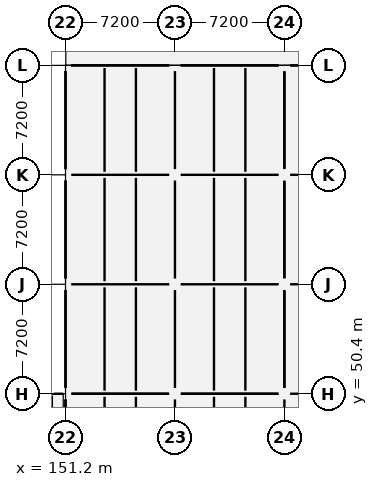
"""IFC4 building model, lengths in metres.
Left out: names, types, materials, properties, quantities, classifications, styles, units other than length and angle.
Written with IfcOpenShell. Run it as: python <this file> out.ifc"""

import sys

from ifc_helpers import new_model, si_unit, direction, frame, frame_2d, origin, origin_2d, place, context, subcontext, project, spatial, rectangle, hollow_rectangle, extrude, element, fill, save


model = new_model("IFC4")
c1 = context("Model", 3, precision=1e-05, world=origin(), true_north=direction((0.0, 1.0)))
c2 = subcontext(c1, "Body", "Model", "MODEL_VIEW")
j1 = project(units=[si_unit("LENGTHUNIT", "METRE"), si_unit("PLANEANGLEUNIT", "RADIAN")], contexts=[c1])
p1 = place(None, origin())
s1 = spatial("IfcSite", under=j1, at=p1, CompositionType="ELEMENT")
p2 = place(p1, origin())
s2 = spatial("IfcBuilding", under=s1, at=p2, CompositionType="ELEMENT")
p3 = place(p2, frame((0.0, 0.0, 5.4)))
s3 = spatial("IfcBuildingStorey", under=s2, at=p3, CompositionType="ELEMENT", Elevation=5.4)
for number, where, z_axis, x_axis in (
    (1, (151.2, 50.4, 0.0), (0.0, 0.0, 1.0), (1.0, 0.0, 0.0)),
    (2, (151.2, 57.6, 0.0), (0.0, 0.0, 1.0), (1.0, 0.0, 0.0)),
    (3, (151.2, 64.8, 0.0), (0.0, 0.0, 1.0), (1.0, 0.0, 0.0)),
    (4, (151.2, 72.0, 0.0), (0.0, 0.0, 1.0), (1.0, 0.0, 0.0)),
    (5, (158.4, 50.4, 0.0), (0.0, 0.0, 1.0), (1.0, 0.0, 0.0)),
    (6, (158.4, 57.6, 0.0), (0.0, 0.0, 1.0), (1.0, 0.0, 0.0)),
    (7, (158.4, 64.8, 0.0), (0.0, 0.0, 1.0), (1.0, 0.0, 0.0)),
    (8, (158.4, 72.0, 0.0), (0.0, 0.0, 1.0), (1.0, 0.0, 0.0)),
    (9, (165.6, 50.4, 0.0), (0.0, 0.0, 1.0), (1.0, 0.0, 0.0)),
    (10, (165.6, 57.6, 0.0), (0.0, 0.0, 1.0), (1.0, 0.0, 0.0)),
    (11, (165.6, 64.8, 0.0), (0.0, 0.0, 1.0), (1.0, 0.0, 0.0)),
    (12, (165.6, 72.0, 0.0), (0.0, 0.0, 1.0), (1.0, 0.0, 0.0)),
):
    element("IfcColumn", number, at=place(p3, frame(where, z_axis=z_axis, x_axis=x_axis)), inside=s3, PredefinedType="COLUMN", context=c2, shape_type="SweptSolid", body=[
        extrude(rectangle(XDim=0.75, YDim=0.75, at=origin_2d()), origin(), (0.0, 0.0, 1.0), 4.2),
    ])
p4 = place(p3, frame((150.3, 50.4, 0.0), z_axis=(0.0, 0.0, 1.0), x_axis=(1.0, 0.0, 0.0)))
e13 = element("IfcColumn", 13, at=p4, inside=s3, PredefinedType="COLUMN", context=c2, shape_type="SweptSolid", body=[
    extrude(hollow_rectangle(XDim=0.25, YDim=0.25, WallThickness=0.012, InnerFilletRadius=0.012, OuterFilletRadius=0.024, at=origin_2d()), origin(), (0.0, 0.0, 1.0), 4.2),
])
p5 = place(p3, frame((151.2, 43.575, 0.0), z_axis=(0.0, 0.0, 1.0), x_axis=(0.0, 1.0, 0.0)))
e14 = element("IfcWall", 14, at=p5, inside=s3, PredefinedType="ELEMENTEDWALL", context=c2, shape_type="SweptSolid", body=[
    extrude(rectangle(XDim=6.45, YDim=0.32, at=frame_2d((3.225, 0.0))), origin(), (0.0, 0.0, 1.0), 3.34),
])
p6 = place(p5, frame((2.475, 0.0, 0.0)))
e15 = element("IfcOpeningElement", 15, at=p6, cuts=e14, PredefinedType="OPENING", context=c2, shape_type="SweptSolid", body=[
    extrude(rectangle(XDim=1.5, YDim=2.2, at=frame_2d((0.75, 1.1))), frame((0.0, 0.172, 0.0), z_axis=(0.0, -1.0, 0.0), x_axis=(1.0, 0.0, 0.0)), (0.0, 0.0, 1.0), 0.344),
])
p7 = place(p3, frame((151.2, 53.8, 0.0), z_axis=(0.0, 0.0, 1.0), x_axis=(0.0, 1.0, 0.0)))
e16 = element("IfcWall", 16, at=p7, inside=s3, PredefinedType="SOLIDWALL", context=c2, shape_type="SweptSolid", body=[
    extrude(rectangle(XDim=0.4, YDim=0.36, at=frame_2d((0.2, 0.0))), origin(), (0.0, 0.0, 1.0), 3.29),
])
p8 = place(p3, frame((151.2, 61.0, 0.0), z_axis=(0.0, 0.0, 1.0), x_axis=(0.0, 1.0, 0.0)))
e17 = element("IfcWall", 17, at=p8, inside=s3, PredefinedType="SOLIDWALL", context=c2, shape_type="SweptSolid", body=[
    extrude(rectangle(XDim=0.4, YDim=0.36, at=frame_2d((0.2, 0.0))), origin(), (0.0, 0.0, 1.0), 3.35),
])
p9 = place(p3, frame((151.2, 68.2, 0.0), z_axis=(0.0, 0.0, 1.0), x_axis=(0.0, 1.0, 0.0)))
e18 = element("IfcWall", 18, at=p9, inside=s3, PredefinedType="SOLIDWALL", context=c2, shape_type="SweptSolid", body=[
    extrude(rectangle(XDim=0.4, YDim=0.36, at=frame_2d((0.2, 0.0))), origin(), (0.0, 0.0, 1.0), 3.3),
])
p10 = place(p3, frame((151.575, 72.0, 0.0), z_axis=(0.0, 0.0, 1.0), x_axis=(1.0, 0.0, 0.0)))
e19 = element("IfcWall", 19, at=p10, inside=s3, PredefinedType="ELEMENTEDWALL", context=c2, shape_type="SweptSolid", body=[
    extrude(rectangle(XDim=6.45, YDim=0.32, at=frame_2d((3.225, 0.0))), origin(), (0.0, 0.0, 1.0), 3.3),
])
p11 = place(p10, frame((2.475, 0.0, 0.0)))
e20 = element("IfcOpeningElement", 20, at=p11, cuts=e19, PredefinedType="OPENING", context=c2, shape_type="SweptSolid", body=[
    extrude(rectangle(XDim=1.5, YDim=2.2, at=frame_2d((0.75, 1.1))), frame((0.0, 0.172, 0.0), z_axis=(0.0, -1.0, 0.0), x_axis=(1.0, 0.0, 0.0)), (0.0, 0.0, 1.0), 0.344),
])
p12 = place(p3, frame((158.775, 72.0, 0.0), z_axis=(0.0, 0.0, 1.0), x_axis=(1.0, 0.0, 0.0)))
e21 = element("IfcWall", 21, at=p12, inside=s3, PredefinedType="ELEMENTEDWALL", context=c2, shape_type="SweptSolid", body=[
    extrude(rectangle(XDim=6.45, YDim=0.32, at=frame_2d((3.225, 0.0))), origin(), (0.0, 0.0, 1.0), 3.3),
])
p13 = place(p12, frame((2.225, 0.0, 0.85)))
e22 = element("IfcOpeningElement", 22, at=p13, cuts=e21, PredefinedType="OPENING", context=c2, shape_type="SweptSolid", body=[
    extrude(rectangle(XDim=2.0, YDim=1.85, at=frame_2d((1.0, 0.925))), frame((0.0, 0.172, 0.0), z_axis=(0.0, -1.0, 0.0), x_axis=(1.0, 0.0, 0.0)), (0.0, 0.0, 1.0), 0.344),
])
p14 = place(p3, frame((165.975, 72.0, 0.0), z_axis=(0.0, 0.0, 1.0), x_axis=(1.0, 0.0, 0.0)))
e23 = element("IfcWall", 23, at=p14, inside=s3, PredefinedType="ELEMENTEDWALL", context=c2, shape_type="SweptSolid", body=[
    extrude(rectangle(XDim=6.45, YDim=0.32, at=frame_2d((3.225, 0.0))), origin(), (0.0, 0.0, 1.0), 3.3),
])
p15 = place(p14, frame((2.625, 0.0, 0.85)))
e24 = element("IfcOpeningElement", 24, at=p15, cuts=e23, PredefinedType="OPENING", context=c2, shape_type="SweptSolid", body=[
    extrude(rectangle(XDim=1.2, YDim=2.2, at=frame_2d((0.6, 1.1))), frame((0.0, 0.172, 0.0), z_axis=(0.0, -1.0, 0.0), x_axis=(1.0, 0.0, 0.0)), (0.0, 0.0, 1.0), 0.344),
])
p16 = place(p3, frame((150.425, 50.4, 0.0), z_axis=(0.0, 0.0, 1.0), x_axis=(1.0, 0.0, 0.0)))
e25 = element("IfcWall", 25, at=p16, inside=s3, PredefinedType="ELEMENTEDWALL", context=c2, shape_type="SweptSolid", body=[
    extrude(rectangle(XDim=0.625, YDim=0.28, at=frame_2d((0.312, 0.0))), origin(), (0.0, 0.0, 1.0), 3.72),
])
p17 = place(p3, frame((165.6, 50.815, 0.0), z_axis=(0.0, 0.0, 1.0), x_axis=(0.0, 1.0, 0.0)))
e26 = element("IfcWall", 26, at=p17, inside=s3, PredefinedType="PARTITIONING", context=c2, shape_type="SweptSolid", body=[
    extrude(rectangle(XDim=6.37, YDim=0.1, at=frame_2d((3.185, 0.0))), origin(), (0.0, 0.0, 1.0), 3.288),
])
p18 = place(p17, frame((2.56, 0.0, 0.0)))
e27 = element("IfcOpeningElement", 27, at=p18, cuts=e26, PredefinedType="OPENING", context=c2, shape_type="SweptSolid", body=[
    extrude(rectangle(XDim=1.25, YDim=2.15, at=frame_2d((0.625, 1.075))), frame((0.0, 0.062, 0.0), z_axis=(0.0, -1.0, 0.0), x_axis=(1.0, 0.0, 0.0)), (0.0, 0.0, 1.0), 0.124),
])
p19 = place(p3, frame((165.6, 58.015, 0.0), z_axis=(0.0, 0.0, 1.0), x_axis=(0.0, 1.0, 0.0)))
e28 = element("IfcWall", 28, at=p19, inside=s3, PredefinedType="PARTITIONING", context=c2, shape_type="SweptSolid", body=[
    extrude(rectangle(XDim=6.37, YDim=0.1, at=frame_2d((3.185, 0.0))), origin(), (0.0, 0.0, 1.0), 3.348),
])
p20 = place(p3, frame((165.6, 65.215, 0.0), z_axis=(0.0, 0.0, 1.0), x_axis=(0.0, 1.0, 0.0)))
e29 = element("IfcWall", 29, at=p20, inside=s3, PredefinedType="PARTITIONING", context=c2, shape_type="SweptSolid", body=[
    extrude(rectangle(XDim=6.37, YDim=0.1, at=frame_2d((3.185, 0.0))), origin(), (0.0, 0.0, 1.0), 3.298),
])
p21 = place(p3, frame((151.615, 50.4, 0.0), z_axis=(0.0, 0.0, 1.0), x_axis=(1.0, 0.0, 0.0)))
e30 = element("IfcWall", 30, at=p21, inside=s3, PredefinedType="PARTITIONING", context=c2, shape_type="SweptSolid", body=[
    extrude(rectangle(XDim=6.37, YDim=0.1, at=frame_2d((3.185, 0.0))), origin(), (0.0, 0.0, 1.0), 3.238),
])
p22 = place(p3, frame((158.815, 50.4, 0.0), z_axis=(0.0, 0.0, 1.0), x_axis=(1.0, 0.0, 0.0)))
e31 = element("IfcWall", 31, at=p22, inside=s3, PredefinedType="PARTITIONING", context=c2, shape_type="SweptSolid", body=[
    extrude(rectangle(XDim=6.37, YDim=0.1, at=frame_2d((3.185, 0.0))), origin(), (0.0, 0.0, 1.0), 3.188),
])
p23 = place(p11, origin())
e32 = element("IfcDoor", 32, at=p23, inside=s3, OperationType="DOUBLE_SWING_LEFT", PredefinedType="DOOR", context=c2, shape_type="SweptSolid", body=[
    extrude(rectangle(XDim=1.5, YDim=2.2, at=frame_2d((0.75, 1.1))), frame((0.0, 0.025, 0.0), z_axis=(0.0, -1.0, 0.0), x_axis=(1.0, 0.0, 0.0)), (0.0, 0.0, 1.0), 0.05),
])
fill(e20, e32)
p24 = place(p13, origin())
e33 = element("IfcWindow", 33, at=p24, inside=s3, PartitioningType="SINGLE_PANEL", PredefinedType="WINDOW", context=c2, shape_type="SweptSolid", body=[
    extrude(rectangle(XDim=2.0, YDim=1.85, at=frame_2d((1.0, 0.925))), frame((0.0, 0.03, 0.0), z_axis=(0.0, -1.0, 0.0), x_axis=(1.0, 0.0, 0.0)), (0.0, 0.0, 1.0), 0.06),
])
fill(e22, e33)
p25 = place(p18, origin())
e34 = element("IfcDoor", 34, at=p25, inside=s3, OperationType="SINGLE_SWING_RIGHT", PredefinedType="DOOR", context=c2, shape_type="SweptSolid", body=[
    extrude(rectangle(XDim=1.25, YDim=2.15, at=frame_2d((0.625, 1.075))), frame((0.0, 0.025, 0.0), z_axis=(0.0, -1.0, 0.0), x_axis=(1.0, 0.0, 0.0)), (0.0, 0.0, 1.0), 0.05),
])
fill(e27, e34)
save(model, sys.argv[1])
